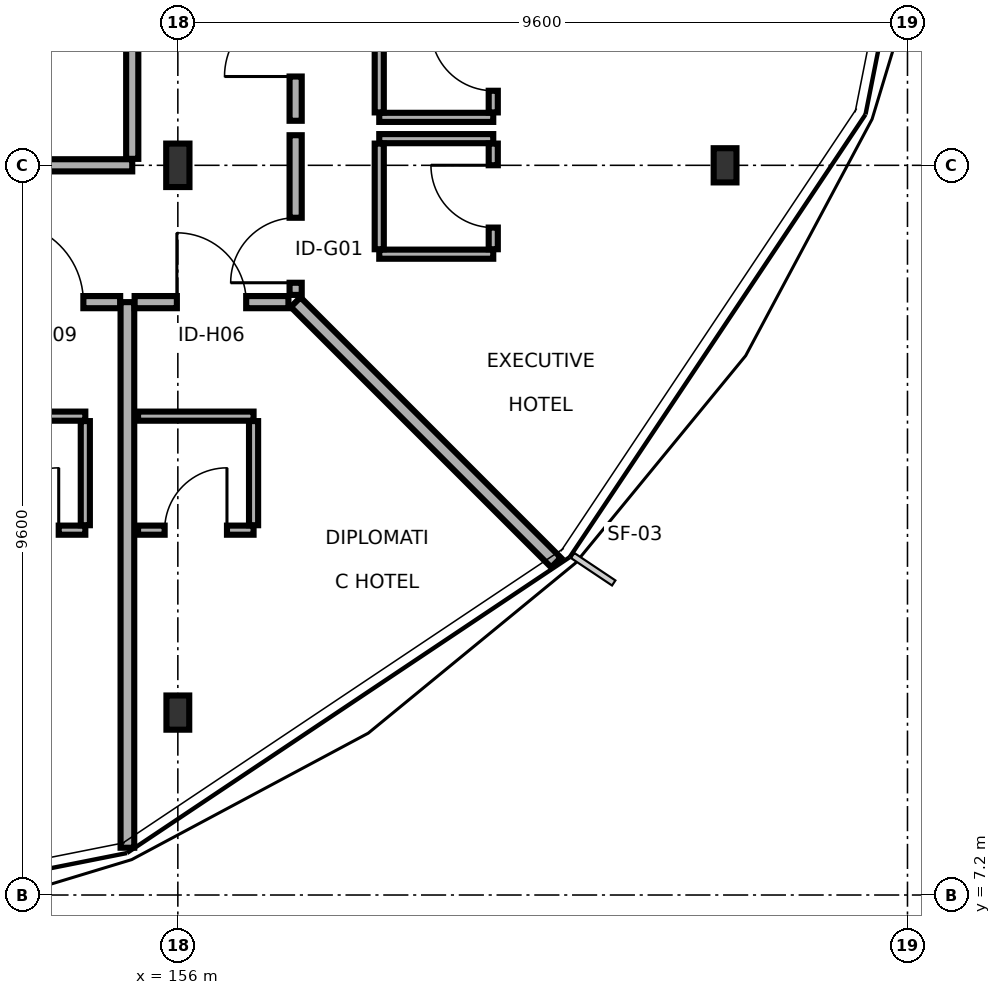
"""IFC4 building model, lengths in metres.
Left out: names, types, materials, properties, quantities, classifications, styles, units other than length and angle.
Written with IfcOpenShell. Run it as: python <this file> out.ifc"""

import sys

from ifc_helpers import new_model, si_unit, direction, frame, frame_2d, origin, origin_2d, place, context, subcontext, project, spatial, rectangle, i_section, extrude, element, fill, save


model = new_model("IFC4")
c1 = context("Model", 3, precision=1e-05, world=origin(), true_north=direction((0.0, 1.0)))
c2 = subcontext(c1, "Body", "Model", "MODEL_VIEW")
j1 = project(units=[si_unit("LENGTHUNIT", "METRE"), si_unit("PLANEANGLEUNIT", "RADIAN")], contexts=[c1])
p1 = place(None, origin())
s1 = spatial("IfcSite", under=j1, at=p1, CompositionType="ELEMENT")
p2 = place(p1, origin())
s2 = spatial("IfcBuilding", under=s1, at=p2, CompositionType="ELEMENT")
p3 = place(p2, frame((0.0, 0.0, 28.3)))
s3 = spatial("IfcBuildingStorey", under=s2, at=p3, CompositionType="ELEMENT", Elevation=28.3)
p4 = place(p3, frame((156.0, 16.8, 0.0), z_axis=(0.0, 0.0, 1.0), x_axis=(1.0, 0.0, 0.0)))
e1 = element("IfcColumn", 1, at=p4, inside=s3, PredefinedType="COLUMN", context=c2, shape_type="SweptSolid", body=[
    extrude(i_section(OverallWidth=0.306, OverallDepth=0.572, WebThickness=0.021, FlangeThickness=0.04, FilletRadius=0.027, at=origin_2d()), origin(), (0.0, 0.0, 1.0), 3.4),
])
for number, where, z_axis, x_axis in (
    (2, (156.0, 9.6, 0.0), (0.0, 0.0, 1.0), (1.0, 0.0, 0.0)),
    (3, (163.2, 16.8, 0.0), (0.0, 0.0, 1.0), (1.0, 0.0, 0.0)),
):
    element("IfcColumn", number, at=place(p3, frame(where, z_axis=z_axis, x_axis=x_axis)), inside=s3, PredefinedType="COLUMN", context=c2, shape_type="SweptSolid", body=[
        extrude(i_section(OverallWidth=0.3, OverallDepth=0.45, WebThickness=0.014, FlangeThickness=0.026, FilletRadius=0.027, at=origin_2d()), origin(), (0.0, 0.0, 1.0), 3.4),
    ])
p5 = place(p3, frame((153.6, 16.8, 0.0), z_axis=(0.0, 0.0, 1.0), x_axis=(1.0, 0.0, 0.0)))
e4 = element("IfcWall", 4, at=p5, inside=s3, PredefinedType="PARTITIONING", context=c2, shape_type="SweptSolid", body=[
    extrude(rectangle(XDim=1.8, YDim=0.16, at=frame_2d((0.9, 0.0))), origin(), (0.0, 0.0, 1.0), 2.71),
])
p6 = place(p3, frame((155.4, 16.885, 0.0), z_axis=(0.0, 0.0, 1.0), x_axis=(0.0, 1.0, 0.0)))
e5 = element("IfcWall", 5, at=p6, inside=s3, PredefinedType="PARTITIONING", context=c2, shape_type="SweptSolid", body=[
    extrude(rectangle(XDim=12.03, YDim=0.16, at=frame_2d((6.015, 0.0))), origin(), (0.0, 0.0, 1.0), 2.71),
])
p7 = place(p6, frame((5.365, 0.0, 0.0)))
e6 = element("IfcOpeningElement", 6, at=p7, cuts=e5, PredefinedType="OPENING", context=c2, shape_type="SweptSolid", body=[
    extrude(rectangle(XDim=1.3, YDim=2.2, at=frame_2d((0.65, 1.1))), frame((0.0, 0.09, 0.0), z_axis=(0.0, -1.0, 0.0), x_axis=(1.0, 0.0, 0.0)), (0.0, 0.0, 1.0), 0.18),
])
p8 = place(p3, frame((153.218, 15.0, 0.0), z_axis=(0.0, 0.0, 1.0), x_axis=(1.0, 0.0, 0.0)))
e7 = element("IfcWall", 7, at=p8, inside=s3, PredefinedType="PARTITIONING", context=c2, shape_type="SweptSolid", body=[
    extrude(rectangle(XDim=2.024, YDim=0.16, at=frame_2d((1.012, 0.0))), origin(), (0.0, 0.0, 1.0), 3.175),
])
p9 = place(p8, frame((0.484, 0.0, 0.0)))
e8 = element("IfcOpeningElement", 8, at=p9, cuts=e7, PredefinedType="OPENING", context=c2, shape_type="SweptSolid", body=[
    extrude(rectangle(XDim=1.055, YDim=2.05, at=frame_2d((0.527, 1.025))), frame((0.0, 0.09, 0.0), z_axis=(0.0, -1.0, 0.0), x_axis=(1.0, 0.0, 0.0)), (0.0, 0.0, 1.0), 0.18),
])
p10 = place(p3, frame((153.263, 12.0, 0.0), z_axis=(0.0, 0.0, 1.0), x_axis=(1.0, 0.0, 0.0)))
e9 = element("IfcWall", 9, at=p10, inside=s3, PredefinedType="PARTITIONING", context=c2, shape_type="SweptSolid", body=[
    extrude(rectangle(XDim=1.52, YDim=0.12, at=frame_2d((0.76, 0.0))), origin(), (0.0, 0.0, 1.0), 3.175),
])
p11 = place(p10, frame((0.35, 0.0, 0.0)))
e10 = element("IfcOpeningElement", 10, at=p11, cuts=e9, PredefinedType="OPENING", context=c2, shape_type="SweptSolid", body=[
    extrude(rectangle(XDim=0.82, YDim=2.08, at=frame_2d((0.41, 1.04))), frame((0.0, 0.07, 0.0), z_axis=(0.0, -1.0, 0.0), x_axis=(1.0, 0.0, 0.0)), (0.0, 0.0, 1.0), 0.14),
])
p12 = place(p3, frame((153.263, 13.5, 0.0), z_axis=(0.0, 0.0, 1.0), x_axis=(1.0, 0.0, 0.0)))
e11 = element("IfcWall", 11, at=p12, inside=s3, PredefinedType="PARTITIONING", context=c2, shape_type="SweptSolid", body=[
    extrude(rectangle(XDim=1.52, YDim=0.12, at=frame_2d((0.76, 0.0))), origin(), (0.0, 0.0, 1.0), 3.175),
])
p13 = place(p3, frame((154.783, 12.065, 0.0), z_axis=(0.0, 0.0, 1.0), x_axis=(0.0, 1.0, 0.0)))
e12 = element("IfcWall", 12, at=p13, inside=s3, PredefinedType="PARTITIONING", context=c2, shape_type="SweptSolid", body=[
    extrude(rectangle(XDim=1.37, YDim=0.12, at=frame_2d((0.685, 0.0))), origin(), (0.0, 0.0, 1.0), 3.175),
])
p14 = place(p3, frame((155.336, 7.822, 0.0), z_axis=(0.0, 0.0, 1.0), x_axis=(0.0, 1.0, 0.0)))
e13 = element("IfcWall", 13, at=p14, inside=s3, PredefinedType="PARTITIONING", context=c2, shape_type="SweptSolid", body=[
    extrude(rectangle(XDim=7.178, YDim=0.18, at=frame_2d((3.589, 0.0))), origin(), (0.0, 0.0, 1.0), 2.66),
])
p15 = place(p3, frame((155.431, 15.0, 0.0), z_axis=(0.0, 0.0, 1.0), x_axis=(1.0, 0.0, 0.0)))
e14 = element("IfcWall", 14, at=p15, inside=s3, PredefinedType="PARTITIONING", context=c2, shape_type="SweptSolid", body=[
    extrude(rectangle(XDim=2.024, YDim=0.16, at=frame_2d((1.012, 0.0))), origin(), (0.0, 0.0, 1.0), 2.71),
])
p16 = place(p15, frame((0.556, 0.0, 0.0)))
e15 = element("IfcOpeningElement", 15, at=p16, cuts=e14, PredefinedType="OPENING", context=c2, shape_type="SweptSolid", body=[
    extrude(rectangle(XDim=0.912, YDim=2.13, at=frame_2d((0.456, 1.065))), frame((0.0, 0.09, 0.0), z_axis=(0.0, -1.0, 0.0), x_axis=(1.0, 0.0, 0.0)), (0.0, 0.0, 1.0), 0.18),
])
p17 = place(p3, frame((155.476, 12.0, 0.0), z_axis=(0.0, 0.0, 1.0), x_axis=(1.0, 0.0, 0.0)))
e16 = element("IfcWall", 16, at=p17, inside=s3, PredefinedType="PARTITIONING", context=c2, shape_type="SweptSolid", body=[
    extrude(rectangle(XDim=1.52, YDim=0.12, at=frame_2d((0.76, 0.0))), origin(), (0.0, 0.0, 1.0), 2.71),
])
p18 = place(p17, frame((0.35, 0.0, 0.0)))
e17 = element("IfcOpeningElement", 17, at=p18, cuts=e16, PredefinedType="OPENING", context=c2, shape_type="SweptSolid", body=[
    extrude(rectangle(XDim=0.82, YDim=2.08, at=frame_2d((0.41, 1.04))), frame((0.0, 0.07, 0.0), z_axis=(0.0, -1.0, 0.0), x_axis=(1.0, 0.0, 0.0)), (0.0, 0.0, 1.0), 0.14),
])
p19 = place(p3, frame((155.476, 13.5, 0.0), z_axis=(0.0, 0.0, 1.0), x_axis=(1.0, 0.0, 0.0)))
e18 = element("IfcWall", 18, at=p19, inside=s3, PredefinedType="PARTITIONING", context=c2, shape_type="SweptSolid", body=[
    extrude(rectangle(XDim=1.52, YDim=0.12, at=frame_2d((0.76, 0.0))), origin(), (0.0, 0.0, 1.0), 2.71),
])
p20 = place(p3, frame((156.996, 12.065, 0.0), z_axis=(0.0, 0.0, 1.0), x_axis=(0.0, 1.0, 0.0)))
e19 = element("IfcWall", 19, at=p20, inside=s3, PredefinedType="PARTITIONING", context=c2, shape_type="SweptSolid", body=[
    extrude(rectangle(XDim=1.37, YDim=0.12, at=frame_2d((0.685, 0.0))), origin(), (0.0, 0.0, 1.0), 3.175),
])
p21 = place(p3, frame((157.55, 15.0, 0.0), z_axis=(0.0, 0.0, 1.0), x_axis=(0.707106781187, -0.707106781187, 0.0)))
e20 = element("IfcWall", 20, at=p21, inside=s3, PredefinedType="PARTITIONING", context=c2, shape_type="SweptSolid", body=[
    extrude(rectangle(XDim=4.844, YDim=0.18, at=frame_2d((2.422, 0.0))), origin(), (0.0, 0.0, 1.0), 2.66),
])
p22 = place(p3, frame((157.55, 15.095, 0.0), z_axis=(0.0, 0.0, 1.0), x_axis=(0.0, 1.0, 0.0)))
e21 = element("IfcWall", 21, at=p22, inside=s3, PredefinedType="PARTITIONING", context=c2, shape_type="SweptSolid", body=[
    extrude(rectangle(XDim=2.101, YDim=0.16, at=frame_2d((1.05, 0.0))), origin(), (0.0, 0.0, 1.0), 2.71),
])
p23 = place(p22, frame((0.16, 0.0, 0.0)))
e22 = element("IfcOpeningElement", 22, at=p23, cuts=e21, PredefinedType="OPENING", context=c2, shape_type="SweptSolid", body=[
    extrude(rectangle(XDim=0.855, YDim=2.05, at=frame_2d((0.427, 1.025))), frame((0.0, 0.09, 0.0), z_axis=(0.0, -1.0, 0.0), x_axis=(1.0, 0.0, 0.0)), (0.0, 0.0, 1.0), 0.18),
])
for number, where, z_axis, x_axis in (
    (23, (158.65, 15.631, 0.0), (0.0, 0.0, 1.0), (1.0, 0.0, 0.0)),
    (24, (158.65, 17.151, 0.0), (0.0, 0.0, 1.0), (1.0, 0.0, 0.0)),
):
    element("IfcWall", number, at=place(p3, frame(where, z_axis=z_axis, x_axis=x_axis)), inside=s3, PredefinedType="PARTITIONING", context=c2, shape_type="SweptSolid", body=[
        extrude(rectangle(XDim=1.5, YDim=0.12, at=frame_2d((0.75, 0.0))), origin(), (0.0, 0.0, 1.0), 3.175),
    ])
p24 = place(p3, frame((158.65, 15.696, 0.0), z_axis=(0.0, 0.0, 1.0), x_axis=(0.0, 1.0, 0.0)))
e25 = element("IfcWall", 25, at=p24, inside=s3, PredefinedType="PARTITIONING", context=c2, shape_type="SweptSolid", body=[
    extrude(rectangle(XDim=1.39, YDim=0.12, at=frame_2d((0.695, 0.0))), origin(), (0.0, 0.0, 1.0), 2.71),
])
p25 = place(p3, frame((160.15, 15.696, 0.0), z_axis=(0.0, 0.0, 1.0), x_axis=(0.0, 1.0, 0.0)))
e26 = element("IfcWall", 26, at=p25, inside=s3, PredefinedType="PARTITIONING", context=c2, shape_type="SweptSolid", body=[
    extrude(rectangle(XDim=1.39, YDim=0.12, at=frame_2d((0.695, 0.0))), origin(), (0.0, 0.0, 1.0), 2.71),
])
p26 = place(p25, frame((0.285, 0.0, 0.0)))
e27 = element("IfcOpeningElement", 27, at=p26, cuts=e26, PredefinedType="OPENING", context=c2, shape_type="SweptSolid", body=[
    extrude(rectangle(XDim=0.82, YDim=2.08, at=frame_2d((0.41, 1.04))), frame((0.0, 0.07, 0.0), z_axis=(0.0, -1.0, 0.0), x_axis=(1.0, 0.0, 0.0)), (0.0, 0.0, 1.0), 0.14),
])
p27 = place(p3, frame((157.55, 17.386, 0.0), z_axis=(0.0, 0.0, 1.0), x_axis=(0.0, 1.0, 0.0)))
e28 = element("IfcWall", 28, at=p27, inside=s3, PredefinedType="PARTITIONING", context=c2, shape_type="SweptSolid", body=[
    extrude(rectangle(XDim=2.101, YDim=0.16, at=frame_2d((1.05, 0.0))), origin(), (0.0, 0.0, 1.0), 3.175),
])
p28 = place(p27, frame((0.583, 0.0, 0.0)))
e29 = element("IfcOpeningElement", 29, at=p28, cuts=e28, PredefinedType="OPENING", context=c2, shape_type="SweptSolid", body=[
    extrude(rectangle(XDim=0.936, YDim=2.07, at=frame_2d((0.468, 1.035))), frame((0.0, 0.09, 0.0), z_axis=(0.0, -1.0, 0.0), x_axis=(1.0, 0.0, 0.0)), (0.0, 0.0, 1.0), 0.18),
])
p29 = place(p3, frame((158.65, 17.431, 0.0), z_axis=(0.0, 0.0, 1.0), x_axis=(1.0, 0.0, 0.0)))
e30 = element("IfcWall", 30, at=p29, inside=s3, PredefinedType="PARTITIONING", context=c2, shape_type="SweptSolid", body=[
    extrude(rectangle(XDim=1.5, YDim=0.12, at=frame_2d((0.75, 0.0))), origin(), (0.0, 0.0, 1.0), 3.175),
])
p30 = place(p3, frame((158.65, 17.496, 0.0), z_axis=(0.0, 0.0, 1.0), x_axis=(0.0, 1.0, 0.0)))
e31 = element("IfcWall", 31, at=p30, inside=s3, PredefinedType="PARTITIONING", context=c2, shape_type="SweptSolid", body=[
    extrude(rectangle(XDim=1.39, YDim=0.12, at=frame_2d((0.695, 0.0))), origin(), (0.0, 0.0, 1.0), 3.175),
])
p31 = place(p3, frame((160.15, 17.496, 0.0), z_axis=(0.0, 0.0, 1.0), x_axis=(0.0, 1.0, 0.0)))
e32 = element("IfcWall", 32, at=p31, inside=s3, PredefinedType="PARTITIONING", context=c2, shape_type="SweptSolid", body=[
    extrude(rectangle(XDim=1.39, YDim=0.12, at=frame_2d((0.695, 0.0))), origin(), (0.0, 0.0, 1.0), 3.175),
])
p32 = place(p31, frame((0.285, 0.0, 0.0)))
e33 = element("IfcOpeningElement", 33, at=p32, cuts=e32, PredefinedType="OPENING", context=c2, shape_type="SweptSolid", body=[
    extrude(rectangle(XDim=0.82, YDim=2.08, at=frame_2d((0.41, 1.04))), frame((0.0, 0.07, 0.0), z_axis=(0.0, -1.0, 0.0), x_axis=(1.0, 0.0, 0.0)), (0.0, 0.0, 1.0), 0.14),
])
p33 = place(p9, origin())
e34 = element("IfcDoor", 34, at=p33, inside=s3, OperationType="SINGLE_SWING_LEFT", PredefinedType="DOOR", context=c2, shape_type="SweptSolid", body=[
    extrude(rectangle(XDim=1.055, YDim=2.05, at=frame_2d((0.527, 1.025))), frame((0.0, 0.025, 0.0), z_axis=(0.0, -1.0, 0.0), x_axis=(1.0, 0.0, 0.0)), (0.0, 0.0, 1.0), 0.05),
])
fill(e8, e34)
p34 = place(p11, origin())
e35 = element("IfcDoor", 35, at=p34, inside=s3, OperationType="SINGLE_SWING_RIGHT", PredefinedType="DOOR", context=c2, shape_type="SweptSolid", body=[
    extrude(rectangle(XDim=0.82, YDim=2.08, at=frame_2d((0.41, 1.04))), frame((0.0, 0.025, 0.0), z_axis=(0.0, -1.0, 0.0), x_axis=(1.0, 0.0, 0.0)), (0.0, 0.0, 1.0), 0.05),
])
fill(e10, e35)
p35 = place(p16, origin())
e36 = element("IfcDoor", 36, at=p35, inside=s3, OperationType="SINGLE_SWING_LEFT", PredefinedType="DOOR", context=c2, shape_type="SweptSolid", body=[
    extrude(rectangle(XDim=0.912, YDim=2.13, at=frame_2d((0.456, 1.065))), frame((0.0, 0.025, 0.0), z_axis=(0.0, -1.0, 0.0), x_axis=(1.0, 0.0, 0.0)), (0.0, 0.0, 1.0), 0.05),
])
fill(e15, e36)
p36 = place(p18, origin())
e37 = element("IfcDoor", 37, at=p36, inside=s3, OperationType="SINGLE_SWING_RIGHT", PredefinedType="DOOR", context=c2, shape_type="SweptSolid", body=[
    extrude(rectangle(XDim=0.82, YDim=2.08, at=frame_2d((0.41, 1.04))), frame((0.0, 0.025, 0.0), z_axis=(0.0, -1.0, 0.0), x_axis=(1.0, 0.0, 0.0)), (0.0, 0.0, 1.0), 0.05),
])
fill(e17, e37)
p37 = place(p23, origin())
e38 = element("IfcDoor", 38, at=p37, inside=s3, OperationType="SINGLE_SWING_LEFT", PredefinedType="DOOR", context=c2, shape_type="SweptSolid", body=[
    extrude(rectangle(XDim=0.855, YDim=2.05, at=frame_2d((0.427, 1.025))), frame((0.0, 0.025, 0.0), z_axis=(0.0, -1.0, 0.0), x_axis=(1.0, 0.0, 0.0)), (0.0, 0.0, 1.0), 0.05),
])
fill(e22, e38)
p38 = place(p26, origin())
e39 = element("IfcDoor", 39, at=p38, inside=s3, OperationType="SINGLE_SWING_RIGHT", PredefinedType="DOOR", context=c2, shape_type="SweptSolid", body=[
    extrude(rectangle(XDim=0.82, YDim=2.08, at=frame_2d((0.41, 1.04))), frame((0.0, 0.025, 0.0), z_axis=(0.0, -1.0, 0.0), x_axis=(1.0, 0.0, 0.0)), (0.0, 0.0, 1.0), 0.05),
])
fill(e27, e39)
p39 = place(p28, origin())
e40 = element("IfcDoor", 40, at=p39, inside=s3, OperationType="SINGLE_SWING_LEFT", PredefinedType="DOOR", context=c2, shape_type="SweptSolid", body=[
    extrude(rectangle(XDim=0.936, YDim=2.07, at=frame_2d((0.468, 1.035))), frame((0.0, 0.025, 0.0), z_axis=(0.0, -1.0, 0.0), x_axis=(1.0, 0.0, 0.0)), (0.0, 0.0, 1.0), 0.05),
])
fill(e29, e40)
p40 = place(p32, origin())
e41 = element("IfcDoor", 41, at=p40, inside=s3, OperationType="SINGLE_SWING_RIGHT", PredefinedType="DOOR", context=c2, shape_type="SweptSolid", body=[
    extrude(rectangle(XDim=0.82, YDim=2.08, at=frame_2d((0.41, 1.04))), frame((0.0, 0.025, 0.0), z_axis=(0.0, -1.0, 0.0), x_axis=(1.0, 0.0, 0.0)), (0.0, 0.0, 1.0), 0.05),
])
fill(e33, e41)
save(model, sys.argv[1])
